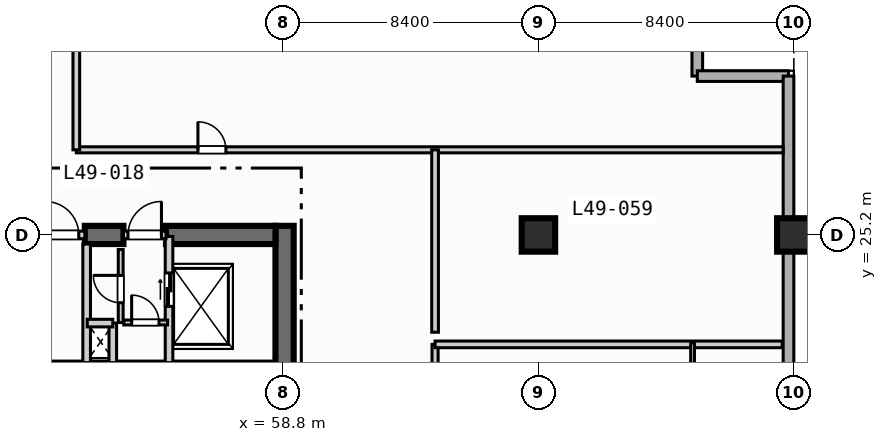
"""IFC4 building model, lengths in metres.
Left out: names, types, materials, properties, quantities, classifications, styles, units other than length and angle.
Written with IfcOpenShell. Run it as: python <this file> out.ifc"""

import sys

from ifc_helpers import new_model, si_unit, direction, frame, frame_2d, origin, origin_2d, place, context, subcontext, project, spatial, rectangle, extrude, element, fill, save


model = new_model("IFC4")
c1 = context("Model", 3, precision=1e-05, world=origin(), true_north=direction((0.0, 1.0)))
c2 = subcontext(c1, "Body", "Model", "MODEL_VIEW")
j1 = project(units=[si_unit("LENGTHUNIT", "METRE"), si_unit("PLANEANGLEUNIT", "RADIAN")], contexts=[c1])
p1 = place(None, origin())
s1 = spatial("IfcSite", under=j1, at=p1, CompositionType="ELEMENT")
p2 = place(p1, origin())
s2 = spatial("IfcBuilding", under=s1, at=p2, CompositionType="ELEMENT")
p3 = place(p2, frame((0.0, 0.0, 201.3)))
s3 = spatial("IfcBuildingStorey", under=s2, at=p3, CompositionType="ELEMENT", Elevation=201.3)
p4 = place(p3, frame((58.85, 20.5, 0.0), z_axis=(0.0, 0.0, 1.0), x_axis=(0.0, 1.0, 0.0)))
e1 = element("IfcWall", 1, at=p4, inside=s3, PredefinedType="SHEAR", context=c2, shape_type="SweptSolid", body=[
    extrude(rectangle(XDim=5.0, YDim=0.6, at=frame_2d((2.5, 0.0))), origin(), (0.0, 0.0, 1.0), 3.47),
])
p5 = place(p3, frame((52.28, 25.2, 0.0), z_axis=(0.0, 0.0, 1.0), x_axis=(1.0, 0.0, 0.0)))
e2 = element("IfcWall", 2, at=p5, inside=s3, PredefinedType="SHEAR", context=c2, shape_type="SweptSolid", body=[
    extrude(rectangle(XDim=1.27, YDim=0.6, at=frame_2d((0.635, 0.0))), origin(), (0.0, 0.0, 1.0), 3.47),
])
p6 = place(p3, frame((54.95, 25.2, 0.0), z_axis=(0.0, 0.0, 1.0), x_axis=(1.0, 0.0, 0.0)))
e3 = element("IfcWall", 3, at=p6, inside=s3, PredefinedType="SHEAR", context=c2, shape_type="SweptSolid", body=[
    extrude(rectangle(XDim=3.6, YDim=0.6, at=frame_2d((1.8, 0.0))), origin(), (0.0, 0.0, 1.0), 3.47),
])
for number, where, z_axis, x_axis in (
    (4, (67.2, 25.2, 0.0), (0.0, 0.0, 1.0), (1.0, 0.0, 0.0)),
    (5, (75.6, 25.2, 0.0), (0.0, 0.0, 1.0), (1.0, 0.0, 0.0)),
):
    element("IfcColumn", number, at=place(p3, frame(where, z_axis=z_axis, x_axis=x_axis)), inside=s3, PredefinedType="COLUMN", context=c2, shape_type="SweptSolid", body=[
        extrude(rectangle(XDim=1.1, YDim=1.1, at=origin_2d()), origin(), (0.0, 0.0, 1.0), 3.7),
    ])
for number, where, z_axis, x_axis in (
    (6, (72.425, 33.425, 0.0), (0.0, 0.0, 1.0), (0.0, -1.0, 0.0)),
    (7, (72.425, 30.425, 0.0), (0.0, 0.0, 1.0), (1.0, 0.0, 0.0)),
):
    element("IfcWall", number, at=place(p3, frame(where, z_axis=z_axis, x_axis=x_axis)), inside=s3, PredefinedType="STANDARD", context=c2, shape_type="SweptSolid", body=[
        extrude(rectangle(XDim=3.0, YDim=0.35, at=frame_2d((1.5, 0.0))), origin(), (0.0, 0.0, 1.0), 3.47),
    ])
p7 = place(p3, frame((75.425, 30.425, 0.0), z_axis=(0.0, 0.0, 1.0), x_axis=(0.0, -1.0, 0.0)))
e8 = element("IfcWall", 8, at=p7, inside=s3, PredefinedType="STANDARD", context=c2, shape_type="SweptSolid", body=[
    extrude(rectangle(XDim=27.25, YDim=0.35, at=frame_2d((13.625, 0.0))), origin(), (0.0, 0.0, 1.0), 3.47),
])
p8 = place(p7, frame((16.625, 0.0, 0.85)))
e9 = element("IfcOpeningElement", 9, at=p8, cuts=e8, PredefinedType="OPENING", context=c2, shape_type="SweptSolid", body=[
    extrude(rectangle(XDim=2.4, YDim=1.95, at=frame_2d((1.2, 0.975))), frame((0.0, 0.185, 0.0), z_axis=(0.0, -1.0, 0.0), x_axis=(1.0, 0.0, 0.0)), (0.0, 0.0, 1.0), 0.37),
])
p9 = place(p3, frame((50.8, 25.2, 0.0), z_axis=(0.0, 0.0, 1.0), x_axis=(1.0, 0.0, 0.0)))
e10 = element("IfcWall", 10, at=p9, inside=s3, PredefinedType="SOLIDWALL", context=c2, shape_type="SweptSolid", body=[
    extrude(rectangle(XDim=1.48, YDim=0.25, at=frame_2d((0.74, 0.0))), origin(), (0.0, 0.0, 1.0), 3.47),
])
p10 = place(p9, frame((0.18, 0.0, 0.0)))
e11 = element("IfcOpeningElement", 11, at=p10, cuts=e10, PredefinedType="OPENING", context=c2, shape_type="SweptSolid", body=[
    extrude(rectangle(XDim=1.1, YDim=2.15, at=frame_2d((0.55, 1.075))), frame((0.0, 0.135, 0.0), z_axis=(0.0, -1.0, 0.0), x_axis=(1.0, 0.0, 0.0)), (0.0, 0.0, 1.0), 0.27),
])
p11 = place(p3, frame((52.34, 21.0, 0.0), z_axis=(0.0, 0.0, 1.0), x_axis=(0.0, 1.0, 0.0)))
e12 = element("IfcWall", 12, at=p11, inside=s3, PredefinedType="SOLIDWALL", context=c2, shape_type="SweptSolid", body=[
    extrude(rectangle(XDim=3.9, YDim=0.25, at=frame_2d((1.95, 0.0))), origin(), (0.0, 0.0, 1.0), 3.47),
])
p12 = place(p3, frame((55.05, 21.0, 0.0), z_axis=(0.0, 0.0, 1.0), x_axis=(0.0, 1.0, 0.0)))
e13 = element("IfcWall", 13, at=p12, inside=s3, PredefinedType="SOLIDWALL", context=c2, shape_type="SweptSolid", body=[
    extrude(rectangle(XDim=4.15, YDim=0.25, at=frame_2d((2.075, 0.0))), origin(), (0.0, 0.0, 1.0), 3.47),
])
p13 = place(p12, frame((1.85, 0.0, 0.0)))
e14 = element("IfcOpeningElement", 14, at=p13, cuts=e13, PredefinedType="OPENING", context=c2, shape_type="SweptSolid", body=[
    extrude(rectangle(XDim=1.1, YDim=2.15, at=frame_2d((0.55, 1.075))), frame((0.0, 0.135, 0.0), z_axis=(0.0, -1.0, 0.0), x_axis=(1.0, 0.0, 0.0)), (0.0, 0.0, 1.0), 0.27),
])
p14 = place(p3, frame((53.55, 25.2, 0.0), z_axis=(0.0, 0.0, 1.0), x_axis=(1.0, 0.0, 0.0)))
e15 = element("IfcWall", 15, at=p14, inside=s3, PredefinedType="SOLIDWALL", context=c2, shape_type="SweptSolid", body=[
    extrude(rectangle(XDim=1.4, YDim=0.25, at=frame_2d((0.7, 0.0))), origin(), (0.0, 0.0, 1.0), 3.47),
])
p15 = place(p14, frame((0.15, 0.0, 0.0)))
e16 = element("IfcOpeningElement", 16, at=p15, cuts=e15, PredefinedType="OPENING", context=c2, shape_type="SweptSolid", body=[
    extrude(rectangle(XDim=1.1, YDim=2.15, at=frame_2d((0.55, 1.075))), frame((0.0, 0.135, 0.0), z_axis=(0.0, -1.0, 0.0), x_axis=(1.0, 0.0, 0.0)), (0.0, 0.0, 1.0), 0.27),
])
p16 = place(p3, frame((53.2, 21.0, 0.0), z_axis=(0.0, 0.0, 1.0), x_axis=(0.0, 1.0, 0.0)))
e17 = element("IfcWall", 17, at=p16, inside=s3, PredefinedType="SOLIDWALL", context=c2, shape_type="SweptSolid", body=[
    extrude(rectangle(XDim=1.3, YDim=0.25, at=frame_2d((0.65, 0.0))), origin(), (0.0, 0.0, 1.0), 3.47),
])
p17 = place(p3, frame((52.36, 22.3, 0.0), z_axis=(0.0, 0.0, 1.0), x_axis=(1.0, 0.0, 0.0)))
e18 = element("IfcWall", 18, at=p17, inside=s3, PredefinedType="SOLIDWALL", context=c2, shape_type="SweptSolid", body=[
    extrude(rectangle(XDim=0.84, YDim=0.25, at=frame_2d((0.42, 0.0))), origin(), (0.0, 0.0, 1.0), 3.47),
])
p18 = place(p3, frame((53.56, 22.32, 0.0), z_axis=(0.0, 0.0, 1.0), x_axis=(1.0, 0.0, 0.0)))
e19 = element("IfcWall", 19, at=p18, inside=s3, PredefinedType="PARTITIONING", context=c2, shape_type="SweptSolid", body=[
    extrude(rectangle(XDim=1.44, YDim=0.16, at=frame_2d((0.72, 0.0))), origin(), (0.0, 0.0, 1.0), 3.47),
])
p19 = place(p18, frame((0.26, 0.0, 0.0)))
e20 = element("IfcOpeningElement", 20, at=p19, cuts=e19, PredefinedType="OPENING", context=c2, shape_type="SweptSolid", body=[
    extrude(rectangle(XDim=0.9, YDim=2.1, at=frame_2d((0.45, 1.05))), frame((0.0, 0.09, 0.0), z_axis=(0.0, -1.0, 0.0), x_axis=(1.0, 0.0, 0.0)), (0.0, 0.0, 1.0), 0.18),
])
p20 = place(p3, frame((53.46, 22.32, 0.0), z_axis=(0.0, 0.0, 1.0), x_axis=(0.0, 1.0, 0.0)))
e21 = element("IfcWall", 21, at=p20, inside=s3, PredefinedType="PARTITIONING", context=c2, shape_type="SweptSolid", body=[
    extrude(rectangle(XDim=2.4, YDim=0.16, at=frame_2d((1.2, 0.0))), origin(), (0.0, 0.0, 1.0), 3.47),
])
p21 = place(p20, frame((0.65, 0.0, 0.0)))
e22 = element("IfcOpeningElement", 22, at=p21, cuts=e21, PredefinedType="OPENING", context=c2, shape_type="SweptSolid", body=[
    extrude(rectangle(XDim=0.9, YDim=2.1, at=frame_2d((0.45, 1.05))), frame((0.0, 0.09, 0.0), z_axis=(0.0, -1.0, 0.0), x_axis=(1.0, 0.0, 0.0)), (0.0, 0.0, 1.0), 0.18),
])
p22 = place(p3, frame((63.8, 3.4, 0.0), z_axis=(0.0, 0.0, 1.0), x_axis=(0.0, 1.0, 0.0)))
e23 = element("IfcWall", 23, at=p22, inside=s3, PredefinedType="PARTITIONING", context=c2, shape_type="SweptSolid", body=[
    extrude(rectangle(XDim=18.2, YDim=0.2, at=frame_2d((9.1, 0.0))), origin(), (0.0, 0.0, 1.0), 3.47),
])
p23 = place(p22, frame((6.2, 0.0, 0.0)))
e24 = element("IfcOpeningElement", 24, at=p23, cuts=e23, PredefinedType="OPENING", context=c2, shape_type="SweptSolid", body=[
    extrude(rectangle(XDim=1.0, YDim=2.15, at=frame_2d((0.5, 1.075))), frame((0.0, 0.11, 0.0), z_axis=(0.0, -1.0, 0.0), x_axis=(1.0, 0.0, 0.0)), (0.0, 0.0, 1.0), 0.22),
])
p24 = place(p3, frame((63.8, 21.6, 0.0), z_axis=(0.0, 0.0, 1.0), x_axis=(1.0, 0.0, 0.0)))
e25 = element("IfcWall", 25, at=p24, inside=s3, PredefinedType="PARTITIONING", context=c2, shape_type="SweptSolid", body=[
    extrude(rectangle(XDim=11.42, YDim=0.22, at=frame_2d((5.71, 0.0))), origin(), (0.0, 0.0, 1.0), 3.47),
])
p25 = place(p3, frame((72.27, 3.25, 0.0), z_axis=(0.0, 0.0, 1.0), x_axis=(0.0, 1.0, 0.0)))
e26 = element("IfcWall", 26, at=p25, inside=s3, PredefinedType="PARTITIONING", context=c2, shape_type="SweptSolid", body=[
    extrude(rectangle(XDim=18.4, YDim=0.125, at=frame_2d((9.2, 0.0))), origin(), (0.0, 0.0, 1.0), 3.47),
])
p26 = place(p25, frame((8.19, 0.0, 0.0)))
e27 = element("IfcOpeningElement", 27, at=p26, cuts=e26, PredefinedType="OPENING", context=c2, shape_type="SweptSolid", body=[
    extrude(rectangle(XDim=0.92, YDim=2.1, at=frame_2d((0.46, 1.05))), frame((0.0, 0.073, 0.0), z_axis=(0.0, -1.0, 0.0), x_axis=(1.0, 0.0, 0.0)), (0.0, 0.0, 1.0), 0.145),
])
p27 = place(p3, frame((52.0, 28.0, 0.0), z_axis=(0.0, 0.0, 1.0), x_axis=(1.0, 0.0, 0.0)))
e28 = element("IfcWall", 28, at=p27, inside=s3, PredefinedType="PARTITIONING", context=c2, shape_type="SweptSolid", body=[
    extrude(rectangle(XDim=23.25, YDim=0.2, at=frame_2d((11.625, 0.0))), origin(), (0.0, 0.0, 1.0), 3.47),
])
p28 = place(p27, frame((4.0, 0.0, 0.0)))
e29 = element("IfcOpeningElement", 29, at=p28, cuts=e28, PredefinedType="OPENING", context=c2, shape_type="SweptSolid", body=[
    extrude(rectangle(XDim=0.92, YDim=2.1, at=frame_2d((0.46, 1.05))), frame((0.0, 0.11, 0.0), z_axis=(0.0, -1.0, 0.0), x_axis=(1.0, 0.0, 0.0)), (0.0, 0.0, 1.0), 0.22),
])
p29 = place(p3, frame((52.0, 28.0, 0.0), z_axis=(0.0, 0.0, 1.0), x_axis=(0.0, 1.0, 0.0)))
e30 = element("IfcWall", 30, at=p29, inside=s3, PredefinedType="PARTITIONING", context=c2, shape_type="SweptSolid", body=[
    extrude(rectangle(XDim=5.3, YDim=0.22, at=frame_2d((2.65, 0.0))), origin(), (0.0, 0.0, 1.0), 3.47),
])
p30 = place(p3, frame((63.8, 22.0, 0.0), z_axis=(0.0, 0.0, 1.0), x_axis=(0.0, 1.0, 0.0)))
e31 = element("IfcWall", 31, at=p30, inside=s3, PredefinedType="PARTITIONING", context=c2, shape_type="SweptSolid", body=[
    extrude(rectangle(XDim=6.0, YDim=0.22, at=frame_2d((3.0, 0.0))), origin(), (0.0, 0.0, 1.0), 3.47),
])
p31 = place(p10, origin())
e32 = element("IfcDoor", 32, at=p31, inside=s3, OperationType="SINGLE_SWING_LEFT", PredefinedType="DOOR", context=c2, shape_type="SweptSolid", body=[
    extrude(rectangle(XDim=1.1, YDim=2.15, at=frame_2d((0.55, 1.075))), frame((0.0, 0.025, 0.0), z_axis=(0.0, -1.0, 0.0), x_axis=(1.0, 0.0, 0.0)), (0.0, 0.0, 1.0), 0.05),
])
fill(e11, e32)
p32 = place(p13, origin())
e33 = element("IfcDoor", 33, at=p32, inside=s3, OperationType="SLIDING_TO_LEFT", PredefinedType="DOOR", context=c2, shape_type="SweptSolid", body=[
    extrude(rectangle(XDim=1.1, YDim=2.15, at=frame_2d((0.55, 1.075))), frame((0.0, 0.025, 0.0), z_axis=(0.0, -1.0, 0.0), x_axis=(1.0, 0.0, 0.0)), (0.0, 0.0, 1.0), 0.05),
])
fill(e14, e33)
p33 = place(p15, origin())
e34 = element("IfcDoor", 34, at=p33, inside=s3, OperationType="SINGLE_SWING_RIGHT", PredefinedType="DOOR", context=c2, shape_type="SweptSolid", body=[
    extrude(rectangle(XDim=1.1, YDim=2.15, at=frame_2d((0.55, 1.075))), frame((0.0, 0.025, 0.0), z_axis=(0.0, -1.0, 0.0), x_axis=(1.0, 0.0, 0.0)), (0.0, 0.0, 1.0), 0.05),
])
fill(e16, e34)
p34 = place(p19, origin())
e35 = element("IfcDoor", 35, at=p34, inside=s3, OperationType="SINGLE_SWING_LEFT", PredefinedType="DOOR", context=c2, shape_type="SweptSolid", body=[
    extrude(rectangle(XDim=0.9, YDim=2.1, at=frame_2d((0.45, 1.05))), frame((0.0, 0.025, 0.0), z_axis=(0.0, -1.0, 0.0), x_axis=(1.0, 0.0, 0.0)), (0.0, 0.0, 1.0), 0.05),
])
fill(e20, e35)
p35 = place(p21, origin())
e36 = element("IfcDoor", 36, at=p35, inside=s3, OperationType="SINGLE_SWING_RIGHT", PredefinedType="DOOR", context=c2, shape_type="SweptSolid", body=[
    extrude(rectangle(XDim=0.9, YDim=2.1, at=frame_2d((0.45, 1.05))), frame((0.0, 0.025, 0.0), z_axis=(0.0, -1.0, 0.0), x_axis=(1.0, 0.0, 0.0)), (0.0, 0.0, 1.0), 0.05),
])
fill(e22, e36)
p36 = place(p28, origin())
e37 = element("IfcDoor", 37, at=p36, inside=s3, OperationType="SINGLE_SWING_LEFT", PredefinedType="DOOR", context=c2, shape_type="SweptSolid", body=[
    extrude(rectangle(XDim=0.92, YDim=2.1, at=frame_2d((0.46, 1.05))), frame((0.0, 0.025, 0.0), z_axis=(0.0, -1.0, 0.0), x_axis=(1.0, 0.0, 0.0)), (0.0, 0.0, 1.0), 0.05),
])
fill(e29, e37)
save(model, sys.argv[1])
